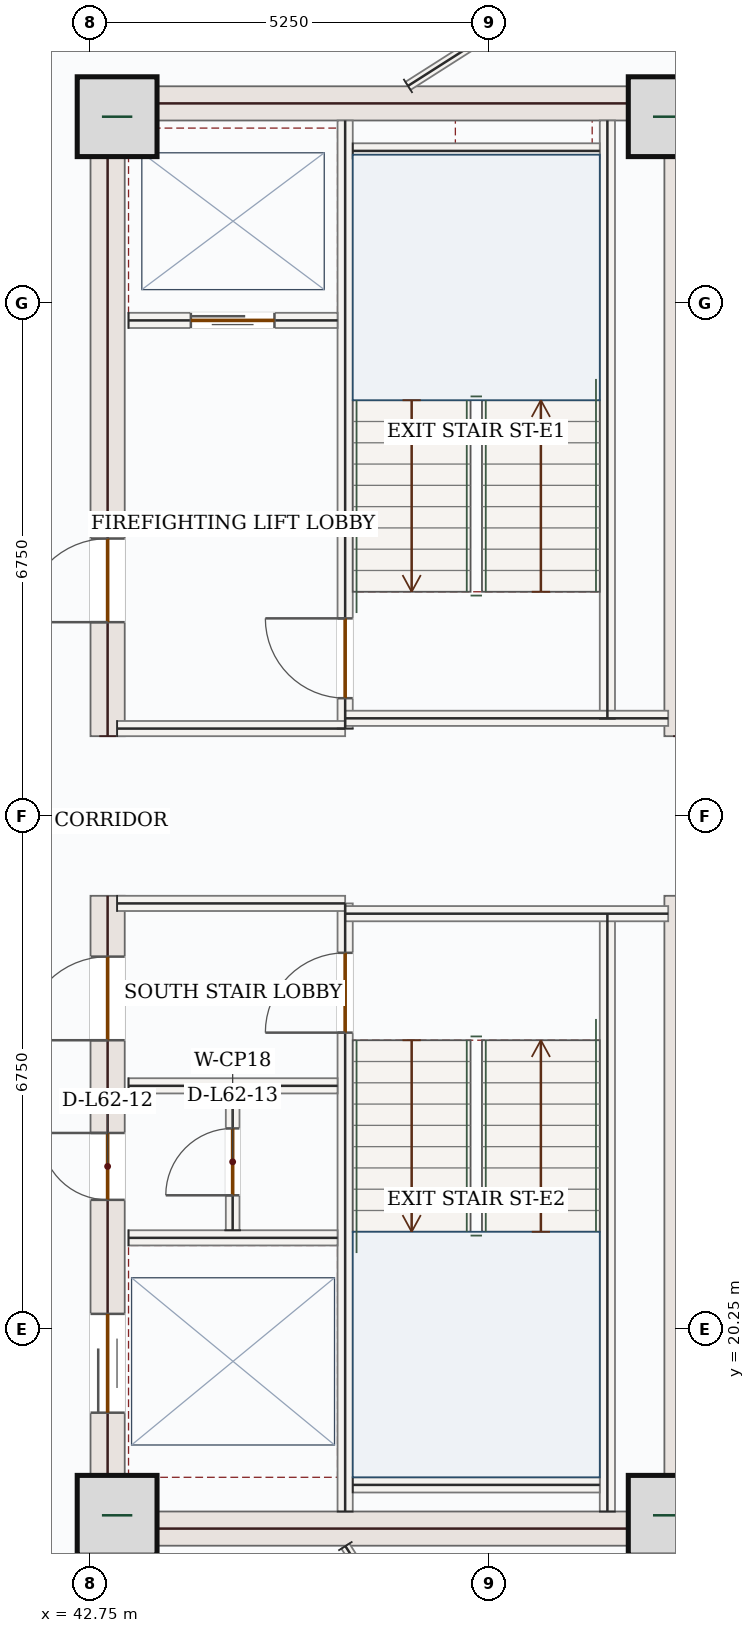
"""IFC4 building model, lengths in metres.
Left out: names, types, materials, properties, quantities, classifications, styles, units other than length and angle.
Written with IfcOpenShell. Run it as: python <this file> out.ifc"""

import sys

from ifc_helpers import new_model, si_unit, direction, frame, frame_2d, origin, origin_2d, place, context, subcontext, project, spatial, rectangle, extrude, source, transform, mapped, element, fill, save


model = new_model("IFC4")
c1 = context("Model", 3, precision=1e-05, world=origin(), true_north=direction((0.0, 1.0)))
c2 = subcontext(c1, "Body", "Model", "MODEL_VIEW")
j1 = project(units=[si_unit("LENGTHUNIT", "METRE"), si_unit("PLANEANGLEUNIT", "RADIAN")], contexts=[c1])
p1 = place(None, origin())
s1 = spatial("IfcSite", under=j1, at=p1, CompositionType="ELEMENT")
p2 = place(p1, origin())
s2 = spatial("IfcBuilding", under=s1, at=p2, CompositionType="ELEMENT")
p3 = place(p2, frame((0.0, 0.0, 261.6)))
s3 = spatial("IfcBuildingStorey", under=s2, at=p3, CompositionType="ELEMENT", Elevation=261.6)
p4 = place(p3, frame((42.975, 17.4, 0.0), z_axis=(0.0, 0.0, 1.0), x_axis=(0.0, 1.0, 0.0)))
e1 = element("IfcWall", 1, at=p4, inside=s3, PredefinedType="SHEAR", context=c2, shape_type="SweptSolid", body=[
    extrude(rectangle(XDim=8.55, YDim=0.45, at=frame_2d((4.275, 0.0))), origin(), (0.0, 0.0, 1.0), 3.5),
])
p5 = place(p4, frame((6.65, 0.0, 0.0)))
e2 = element("IfcOpeningElement", 2, at=p5, cuts=e1, PredefinedType="OPENING", context=c2, shape_type="SweptSolid", body=[
    extrude(rectangle(XDim=1.1, YDim=2.2, at=frame_2d((0.55, 1.1))), frame((0.0, 0.235, 0.0), z_axis=(0.0, -1.0, 0.0), x_axis=(1.0, 0.0, 0.0)), (0.0, 0.0, 1.0), 0.47),
])
p6 = place(p4, frame((1.75, 0.0, 0.0)))
e3 = element("IfcOpeningElement", 3, at=p6, cuts=e1, PredefinedType="OPENING", context=c2, shape_type="SweptSolid", body=[
    extrude(rectangle(XDim=1.3, YDim=2.2, at=frame_2d((0.65, 1.1))), frame((0.0, 0.235, 0.0), z_axis=(0.0, -1.0, 0.0), x_axis=(1.0, 0.0, 0.0)), (0.0, 0.0, 1.0), 0.47),
])
p7 = place(p4, frame((4.55, 0.0, 0.0)))
e4 = element("IfcOpeningElement", 4, at=p7, cuts=e1, PredefinedType="OPENING", context=c2, shape_type="SweptSolid", body=[
    extrude(rectangle(XDim=0.88, YDim=2.1, at=frame_2d((0.44, 1.05))), frame((0.0, 0.235, 0.0), z_axis=(0.0, -1.0, 0.0), x_axis=(1.0, 0.0, 0.0)), (0.0, 0.0, 1.0), 0.47),
])
p8 = place(p3, frame((42.975, 28.05, 0.0), z_axis=(0.0, 0.0, 1.0), x_axis=(0.0, 1.0, 0.0)))
e5 = element("IfcWall", 5, at=p8, inside=s3, PredefinedType="SHEAR", context=c2, shape_type="SweptSolid", body=[
    extrude(rectangle(XDim=8.55, YDim=0.45, at=frame_2d((4.275, 0.0))), origin(), (0.0, 0.0, 1.0), 3.5),
])
p9 = place(p8, frame((1.5, 0.0, 0.0)))
e6 = element("IfcOpeningElement", 6, at=p9, cuts=e5, PredefinedType="OPENING", context=c2, shape_type="SweptSolid", body=[
    extrude(rectangle(XDim=1.1, YDim=2.2, at=frame_2d((0.55, 1.1))), frame((0.0, 0.235, 0.0), z_axis=(0.0, -1.0, 0.0), x_axis=(1.0, 0.0, 0.0)), (0.0, 0.0, 1.0), 0.47),
])
m1 = source(origin(), c2, "Body", "SweptSolid", [
    extrude(rectangle(XDim=8.55, YDim=0.45, at=frame_2d((4.275, 0.0))), origin(), (0.0, 0.0, 1.0), 3.5),
])
for number, where, z_axis, x_axis in (
    (7, (50.525, 17.4, 0.0), (0.0, 0.0, 1.0), (0.0, 1.0, 0.0)),
    (8, (50.525, 28.05, 0.0), (0.0, 0.0, 1.0), (0.0, 1.0, 0.0)),
):
    element("IfcWall", number, at=place(p3, frame(where, z_axis=z_axis, x_axis=x_axis)), inside=s3, PredefinedType="SHEAR", context=c2, shape_type="MappedRepresentation", body=[
        mapped(m1, transform((0.0, 0.0, 0.0), x_axis=(1.0, 0.0, 0.0), y_axis=(0.0, 1.0, 0.0), z_axis=(0.0, 0.0, 1.0), scale=1.0)),
    ])
m2 = source(origin(), c2, "Body", "SweptSolid", [
    extrude(rectangle(XDim=7.1, YDim=0.45, at=frame_2d((3.55, 0.0))), origin(), (0.0, 0.0, 1.0), 3.5),
])
for number, where, z_axis, x_axis in (
    (9, (43.2, 17.625, 0.0), (0.0, 0.0, 1.0), (1.0, 0.0, 0.0)),
    (10, (43.2, 36.375, 0.0), (0.0, 0.0, 1.0), (1.0, 0.0, 0.0)),
):
    element("IfcWall", number, at=place(p3, frame(where, z_axis=z_axis, x_axis=x_axis)), inside=s3, PredefinedType="SHEAR", context=c2, shape_type="MappedRepresentation", body=[
        mapped(m2, transform((0.0, 0.0, 0.0), x_axis=(1.0, 0.0, 0.0), y_axis=(0.0, 1.0, 0.0), z_axis=(0.0, 0.0, 1.0), scale=1.0)),
    ])
m3 = source(origin(), c2, "Body", "SweptSolid", [
    extrude(rectangle(XDim=1.05, YDim=1.05, at=origin_2d()), origin(), (0.0, 0.0, 1.0), 3.75),
])
for number, where, z_axis, x_axis in (
    (11, (43.1, 17.8, 0.0), (0.0, 0.0, 1.0), (1.0, 0.0, 0.0)),
    (12, (50.35, 17.8, 0.0), (0.0, 0.0, 1.0), (1.0, 0.0, 0.0)),
    (13, (43.1, 36.2, 0.0), (0.0, 0.0, 1.0), (1.0, 0.0, 0.0)),
    (14, (50.35, 36.2, 0.0), (0.0, 0.0, 1.0), (1.0, 0.0, 0.0)),
):
    element("IfcColumn", number, at=place(p3, frame(where, z_axis=z_axis, x_axis=x_axis)), inside=s3, PredefinedType="COLUMN", context=c2, shape_type="MappedRepresentation", body=[
        mapped(m3, transform((0.0, 0.0, 0.0), x_axis=(1.0, 0.0, 0.0), y_axis=(0.0, 1.0, 0.0), z_axis=(0.0, 0.0, 1.0), scale=1.0)),
    ])
m4 = source(origin(), c2, "Body", "SweptSolid", [
    extrude(rectangle(XDim=7.87, YDim=0.2, at=frame_2d((3.935, 0.0))), origin(), (0.0, 0.0, 1.0), 3.5),
])
for number, where, z_axis, x_axis in (
    (15, (49.55, 17.85, 0.0), (0.0, 0.0, 1.0), (0.0, 1.0, 0.0)),
    (16, (49.55, 28.28, 0.0), (0.0, 0.0, 1.0), (0.0, 1.0, 0.0)),
):
    element("IfcWall", number, at=place(p3, frame(where, z_axis=z_axis, x_axis=x_axis)), inside=s3, PredefinedType="SOLIDWALL", context=c2, shape_type="MappedRepresentation", body=[
        mapped(m4, transform((0.0, 0.0, 0.0), x_axis=(1.0, 0.0, 0.0), y_axis=(0.0, 1.0, 0.0), z_axis=(0.0, 0.0, 1.0), scale=1.0)),
    ])
p10 = place(p3, frame((46.1, 17.85, 0.0), z_axis=(0.0, 0.0, 1.0), x_axis=(0.0, 1.0, 0.0)))
e17 = element("IfcWall", 17, at=p10, inside=s3, PredefinedType="SOLIDWALL", context=c2, shape_type="SweptSolid", body=[
    extrude(rectangle(XDim=8.0, YDim=0.2, at=frame_2d((4.0, 0.0))), origin(), (0.0, 0.0, 1.0), 3.5),
])
p11 = place(p10, frame((6.3, 0.0, 0.0)))
e18 = element("IfcOpeningElement", 18, at=p11, cuts=e17, PredefinedType="OPENING", context=c2, shape_type="SweptSolid", body=[
    extrude(rectangle(XDim=1.05, YDim=2.15, at=frame_2d((0.525, 1.075))), frame((0.0, 0.11, 0.0), z_axis=(0.0, -1.0, 0.0), x_axis=(1.0, 0.0, 0.0)), (0.0, 0.0, 1.0), 0.22),
])
p12 = place(p3, frame((46.1, 28.15, 0.0), z_axis=(0.0, 0.0, 1.0), x_axis=(0.0, 1.0, 0.0)))
e19 = element("IfcWall", 19, at=p12, inside=s3, PredefinedType="SOLIDWALL", context=c2, shape_type="SweptSolid", body=[
    extrude(rectangle(XDim=8.0, YDim=0.2, at=frame_2d((4.0, 0.0))), origin(), (0.0, 0.0, 1.0), 3.5),
])
p13 = place(p12, frame((0.4, 0.0, 0.0)))
e20 = element("IfcOpeningElement", 20, at=p13, cuts=e19, PredefinedType="OPENING", context=c2, shape_type="SweptSolid", body=[
    extrude(rectangle(XDim=1.05, YDim=2.15, at=frame_2d((0.525, 1.075))), frame((0.0, 0.11, 0.0), z_axis=(0.0, -1.0, 0.0), x_axis=(1.0, 0.0, 0.0)), (0.0, 0.0, 1.0), 0.22),
])
m5 = source(origin(), c2, "Body", "SweptSolid", [
    extrude(rectangle(XDim=3.0, YDim=0.2, at=frame_2d((1.5, 0.0))), origin(), (0.0, 0.0, 1.0), 3.5),
])
p14 = place(p3, frame((43.1, 25.85, 0.0), z_axis=(0.0, 0.0, 1.0), x_axis=(1.0, 0.0, 0.0)))
e21 = element("IfcWall", 21, at=p14, inside=s3, PredefinedType="SOLIDWALL", context=c2, shape_type="MappedRepresentation", body=[
    mapped(m5, transform((0.0, 0.0, 0.0), x_axis=(1.0, 0.0, 0.0), y_axis=(0.0, 1.0, 0.0), z_axis=(0.0, 0.0, 1.0), scale=1.0)),
])
m6 = source(origin(), c2, "Body", "SweptSolid", [
    extrude(rectangle(XDim=4.25, YDim=0.2, at=frame_2d((2.125, 0.0))), origin(), (0.0, 0.0, 1.0), 3.5),
])
p15 = place(p3, frame((46.1, 25.715, 0.0), z_axis=(0.0, 0.0, 1.0), x_axis=(1.0, 0.0, 0.0)))
e22 = element("IfcWall", 22, at=p15, inside=s3, PredefinedType="SOLIDWALL", context=c2, shape_type="MappedRepresentation", body=[
    mapped(m6, transform((0.0, 0.0, 0.0), x_axis=(1.0, 0.0, 0.0), y_axis=(0.0, 1.0, 0.0), z_axis=(0.0, 0.0, 1.0), scale=1.0)),
])
p16 = place(p3, frame((43.1, 28.15, 0.0), z_axis=(0.0, 0.0, 1.0), x_axis=(1.0, 0.0, 0.0)))
e23 = element("IfcWall", 23, at=p16, inside=s3, PredefinedType="SOLIDWALL", context=c2, shape_type="MappedRepresentation", body=[
    mapped(m5, transform((0.0, 0.0, 0.0), x_axis=(1.0, 0.0, 0.0), y_axis=(0.0, 1.0, 0.0), z_axis=(0.0, 0.0, 1.0), scale=1.0)),
])
p17 = place(p3, frame((46.1, 28.285, 0.0), z_axis=(0.0, 0.0, 1.0), x_axis=(1.0, 0.0, 0.0)))
e24 = element("IfcWall", 24, at=p17, inside=s3, PredefinedType="SOLIDWALL", context=c2, shape_type="MappedRepresentation", body=[
    mapped(m6, transform((0.0, 0.0, 0.0), x_axis=(1.0, 0.0, 0.0), y_axis=(0.0, 1.0, 0.0), z_axis=(0.0, 0.0, 1.0), scale=1.0)),
])
m7 = source(origin(), c2, "Body", "SweptSolid", [
    extrude(rectangle(XDim=3.25, YDim=0.2, at=frame_2d((1.625, 0.0))), origin(), (0.0, 0.0, 1.0), 3.5),
])
for number, where, z_axis, x_axis in (
    (25, (46.2, 35.75, 0.0), (0.0, 0.0, 1.0), (1.0, 0.0, 0.0)),
    (26, (46.2, 18.2, 0.0), (0.0, 0.0, 1.0), (1.0, 0.0, 0.0)),
):
    element("IfcWall", number, at=place(p3, frame(where, z_axis=z_axis, x_axis=x_axis)), inside=s3, PredefinedType="SOLIDWALL", context=c2, shape_type="MappedRepresentation", body=[
        mapped(m7, transform((0.0, 0.0, 0.0), x_axis=(1.0, 0.0, 0.0), y_axis=(0.0, 1.0, 0.0), z_axis=(0.0, 0.0, 1.0), scale=1.0)),
    ])
p18 = place(p3, frame((43.25, 33.52, 0.0), z_axis=(0.0, 0.0, 1.0), x_axis=(1.0, 0.0, 0.0)))
e27 = element("IfcWall", 27, at=p18, inside=s3, PredefinedType="SOLIDWALL", context=c2, shape_type="SweptSolid", body=[
    extrude(rectangle(XDim=2.75, YDim=0.2, at=frame_2d((1.375, 0.0))), origin(), (0.0, 0.0, 1.0), 3.5),
])
p19 = place(p18, frame((0.82, 0.0, 0.0)))
e28 = element("IfcOpeningElement", 28, at=p19, cuts=e27, PredefinedType="OPENING", context=c2, shape_type="SweptSolid", body=[
    extrude(rectangle(XDim=1.1, YDim=2.15, at=frame_2d((0.55, 1.075))), frame((0.0, 0.11, 0.0), z_axis=(0.0, -1.0, 0.0), x_axis=(1.0, 0.0, 0.0)), (0.0, 0.0, 1.0), 0.22),
])
m8 = source(origin(), c2, "Body", "SweptSolid", [
    extrude(rectangle(XDim=2.75, YDim=0.2, at=frame_2d((1.375, 0.0))), origin(), (0.0, 0.0, 1.0), 3.5),
])
for number, where, z_axis, x_axis in (
    (29, (43.25, 23.45, 0.0), (0.0, 0.0, 1.0), (1.0, 0.0, 0.0)),
    (30, (43.25, 21.45, 0.0), (0.0, 0.0, 1.0), (1.0, 0.0, 0.0)),
):
    element("IfcWall", number, at=place(p3, frame(where, z_axis=z_axis, x_axis=x_axis)), inside=s3, PredefinedType="SOLIDWALL", context=c2, shape_type="MappedRepresentation", body=[
        mapped(m8, transform((0.0, 0.0, 0.0), x_axis=(1.0, 0.0, 0.0), y_axis=(0.0, 1.0, 0.0), z_axis=(0.0, 0.0, 1.0), scale=1.0)),
    ])
p20 = place(p3, frame((44.62, 21.55, 0.0), z_axis=(0.0, 0.0, 1.0), x_axis=(0.0, 1.0, 0.0)))
e31 = element("IfcWall", 31, at=p20, inside=s3, PredefinedType="PARTITIONING", context=c2, shape_type="SweptSolid", body=[
    extrude(rectangle(XDim=1.8, YDim=0.18, at=frame_2d((0.9, 0.0))), origin(), (0.0, 0.0, 1.0), 3.5),
])
p21 = place(p20, frame((0.46, 0.0, 0.0)))
e32 = element("IfcOpeningElement", 32, at=p21, cuts=e31, PredefinedType="OPENING", context=c2, shape_type="SweptSolid", body=[
    extrude(rectangle(XDim=0.88, YDim=2.1, at=frame_2d((0.44, 1.05))), frame((0.0, 0.1, 0.0), z_axis=(0.0, -1.0, 0.0), x_axis=(1.0, 0.0, 0.0)), (0.0, 0.0, 1.0), 0.2),
])
p22 = place(p3, frame((46.927, 36.605, 0.0), z_axis=(0.0, 0.0, 1.0), x_axis=(0.843398332862, 0.537288797693, 0.0)))
e33 = element("IfcWall", 33, at=p22, inside=s3, PredefinedType="PARTITIONING", context=c2, shape_type="SweptSolid", body=[
    extrude(rectangle(XDim=5.924, YDim=0.125, at=frame_2d((2.962, 0.0))), origin(), (0.0, 0.0, 1.0), 3.5),
])
p23 = place(p22, frame((2.487, 0.0, 0.0)))
e34 = element("IfcOpeningElement", 34, at=p23, cuts=e33, PredefinedType="OPENING", context=c2, shape_type="SweptSolid", body=[
    extrude(rectangle(XDim=0.95, YDim=2.15, at=frame_2d((0.475, 1.075))), frame((0.0, 0.073, 0.0), z_axis=(0.0, -1.0, 0.0), x_axis=(1.0, 0.0, 0.0)), (0.0, 0.0, 1.0), 0.145),
])
m9 = source(origin(), c2, "Body", "SweptSolid", [
    extrude(rectangle(XDim=5.726, YDim=0.125, at=frame_2d((2.863, 0.0))), origin(), (0.0, 0.0, 1.0), 3.5),
])
p24 = place(p3, frame((46.103, 17.395, 0.0), z_axis=(0.0, 0.0, 1.0), x_axis=(0.537333366959, -0.843369938255, 0.0)))
e35 = element("IfcWall", 35, at=p24, inside=s3, PredefinedType="PARTITIONING", context=c2, shape_type="MappedRepresentation", body=[
    mapped(m9, transform((0.0, 0.0, 0.0), x_axis=(1.0, 0.0, 0.0), y_axis=(0.0, 1.0, 0.0), z_axis=(0.0, 0.0, 1.0), scale=1.0)),
])
m10 = source(origin(), c2, "Body", "SweptSolid", [
    extrude(rectangle(XDim=1.05, YDim=2.15, at=frame_2d((0.525, 1.075))), frame((0.0, 0.025, 0.0), z_axis=(0.0, -1.0, 0.0), x_axis=(1.0, 0.0, 0.0)), (0.0, 0.0, 1.0), 0.05),
])
p25 = place(p13, origin())
e36 = element("IfcDoor", 36, at=p25, inside=s3, OperationType="SINGLE_SWING_RIGHT", PredefinedType="DOOR", context=c2, shape_type="MappedRepresentation", body=[
    mapped(m10, transform((0.0, 0.0, 0.0), x_axis=(1.0, 0.0, 0.0), y_axis=(0.0, 1.0, 0.0), z_axis=(0.0, 0.0, 1.0), scale=1.0)),
])
fill(e20, e36)
p26 = place(p11, origin())
e37 = element("IfcDoor", 37, at=p26, inside=s3, OperationType="SINGLE_SWING_LEFT", PredefinedType="DOOR", context=c2, shape_type="MappedRepresentation", body=[
    mapped(m10, transform((0.0, 0.0, 0.0), x_axis=(1.0, 0.0, 0.0), y_axis=(0.0, 1.0, 0.0), z_axis=(0.0, 0.0, 1.0), scale=1.0)),
])
fill(e18, e37)
m11 = source(origin(), c2, "Body", "SweptSolid", [
    extrude(rectangle(XDim=1.1, YDim=2.15, at=frame_2d((0.55, 1.075))), frame((0.0, 0.025, 0.0), z_axis=(0.0, -1.0, 0.0), x_axis=(1.0, 0.0, 0.0)), (0.0, 0.0, 1.0), 0.05),
])
p27 = place(p19, origin())
e38 = element("IfcDoor", 38, at=p27, inside=s3, OperationType="DOUBLE_DOOR_SLIDING", PredefinedType="DOOR", context=c2, shape_type="MappedRepresentation", body=[
    mapped(m11, transform((0.0, 0.0, 0.0), x_axis=(1.0, 0.0, 0.0), y_axis=(0.0, 1.0, 0.0), z_axis=(0.0, 0.0, 1.0), scale=1.0)),
])
fill(e28, e38)
m12 = source(origin(), c2, "Body", "SweptSolid", [
    extrude(rectangle(XDim=1.1, YDim=2.2, at=frame_2d((0.55, 1.1))), frame((0.0, 0.025, 0.0), z_axis=(0.0, -1.0, 0.0), x_axis=(1.0, 0.0, 0.0)), (0.0, 0.0, 1.0), 0.05),
])
p28 = place(p9, origin())
e39 = element("IfcDoor", 39, at=p28, inside=s3, OperationType="SINGLE_SWING_LEFT", PredefinedType="DOOR", context=c2, shape_type="MappedRepresentation", body=[
    mapped(m12, transform((0.0, 0.0, 0.0), x_axis=(1.0, 0.0, 0.0), y_axis=(0.0, 1.0, 0.0), z_axis=(0.0, 0.0, 1.0), scale=1.0)),
])
fill(e6, e39)
p29 = place(p5, origin())
e40 = element("IfcDoor", 40, at=p29, inside=s3, OperationType="SINGLE_SWING_LEFT", PredefinedType="DOOR", context=c2, shape_type="MappedRepresentation", body=[
    mapped(m12, transform((0.0, 0.0, 0.0), x_axis=(1.0, 0.0, 0.0), y_axis=(0.0, 1.0, 0.0), z_axis=(0.0, 0.0, 1.0), scale=1.0)),
])
fill(e2, e40)
m13 = source(origin(), c2, "Body", "SweptSolid", [
    extrude(rectangle(XDim=1.3, YDim=2.2, at=frame_2d((0.65, 1.1))), frame((0.0, 0.025, 0.0), z_axis=(0.0, -1.0, 0.0), x_axis=(1.0, 0.0, 0.0)), (0.0, 0.0, 1.0), 0.05),
])
p30 = place(p6, origin())
e41 = element("IfcDoor", 41, at=p30, inside=s3, OperationType="DOUBLE_DOOR_SLIDING", PredefinedType="DOOR", context=c2, shape_type="MappedRepresentation", body=[
    mapped(m13, transform((0.0, 0.0, 0.0), x_axis=(1.0, 0.0, 0.0), y_axis=(0.0, 1.0, 0.0), z_axis=(0.0, 0.0, 1.0), scale=1.0)),
])
fill(e3, e41)
m14 = source(origin(), c2, "Body", "SweptSolid", [
    extrude(rectangle(XDim=0.88, YDim=2.1, at=frame_2d((0.44, 1.05))), frame((0.0, 0.025, 0.0), z_axis=(0.0, -1.0, 0.0), x_axis=(1.0, 0.0, 0.0)), (0.0, 0.0, 1.0), 0.05),
])
p31 = place(p7, origin())
e42 = element("IfcDoor", 42, at=p31, inside=s3, OperationType="SINGLE_SWING_RIGHT", PredefinedType="DOOR", context=c2, shape_type="MappedRepresentation", body=[
    mapped(m14, transform((0.0, 0.0, 0.0), x_axis=(1.0, 0.0, 0.0), y_axis=(0.0, 1.0, 0.0), z_axis=(0.0, 0.0, 1.0), scale=1.0)),
])
fill(e4, e42)
p32 = place(p21, origin())
e43 = element("IfcDoor", 43, at=p32, inside=s3, OperationType="SINGLE_SWING_LEFT", PredefinedType="DOOR", context=c2, shape_type="MappedRepresentation", body=[
    mapped(m14, transform((0.0, 0.0, 0.0), x_axis=(1.0, 0.0, 0.0), y_axis=(0.0, 1.0, 0.0), z_axis=(0.0, 0.0, 1.0), scale=1.0)),
])
fill(e32, e43)
save(model, sys.argv[1])
